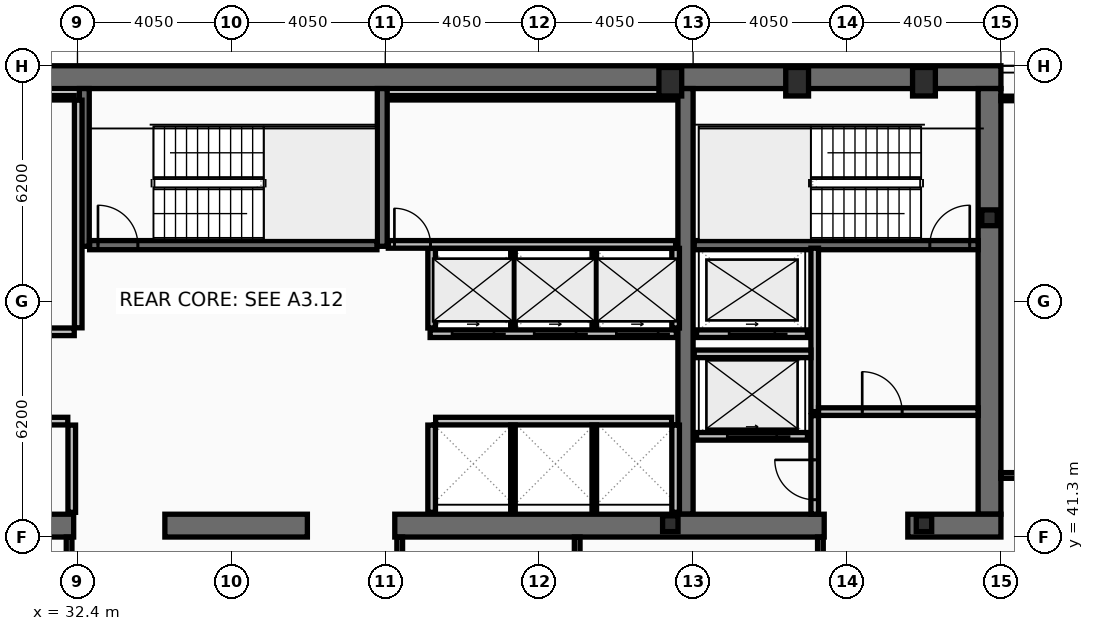
"""IFC4 building model, lengths in metres.
Left out: names, types, materials, properties, quantities, classifications, styles, units other than length and angle.
Written with IfcOpenShell. Run it as: python <this file> out.ifc"""

import sys

from ifc_helpers import new_model, si_unit, direction, frame, frame_2d, origin, origin_2d, place, context, subcontext, project, spatial, rectangle, hollow_rectangle, i_section, extrude, element, fill, save


model = new_model("IFC4")
c1 = context("Model", 3, precision=1e-05, world=origin(), true_north=direction((0.0, 1.0)))
c2 = subcontext(c1, "Body", "Model", "MODEL_VIEW")
j1 = project(units=[si_unit("LENGTHUNIT", "METRE"), si_unit("PLANEANGLEUNIT", "RADIAN")], contexts=[c1])
p1 = place(None, origin())
s1 = spatial("IfcSite", under=j1, at=p1, CompositionType="ELEMENT")
p2 = place(p1, origin())
s2 = spatial("IfcBuilding", under=s1, at=p2, CompositionType="ELEMENT")
p3 = place(p2, frame((0.0, 0.0, 203.0)))
s3 = spatial("IfcBuildingStorey", under=s2, at=p3, CompositionType="ELEMENT", Elevation=203.0)
p4 = place(p3, frame((16.2, 53.4, 0.0), z_axis=(0.0, 0.0, 1.0), x_axis=(1.0, 0.0, 0.0)))
e1 = element("IfcWall", 1, at=p4, inside=s3, PredefinedType="SHEAR", context=c2, shape_type="SweptSolid", body=[
    extrude(rectangle(XDim=40.5, YDim=0.6, at=frame_2d((20.25, 0.0))), origin(), (0.0, 0.0, 1.0), 3.44),
])
p5 = place(p3, frame((56.4, 53.1, 0.0), z_axis=(0.0, 0.0, 1.0), x_axis=(0.0, -1.0, 0.0)))
e2 = element("IfcWall", 2, at=p5, inside=s3, PredefinedType="SHEAR", context=c2, shape_type="SweptSolid", body=[
    extrude(rectangle(XDim=11.2, YDim=0.6, at=frame_2d((5.6, 0.0))), origin(), (0.0, 0.0, 1.0), 3.44),
])
p6 = place(p3, frame((48.4, 41.9, 0.0), z_axis=(0.0, 0.0, 1.0), x_axis=(0.0, 1.0, 0.0)))
e3 = element("IfcWall", 3, at=p6, inside=s3, PredefinedType="SHEAR", context=c2, shape_type="SweptSolid", body=[
    extrude(rectangle(XDim=11.2, YDim=0.4, at=frame_2d((5.6, 0.0))), origin(), (0.0, 0.0, 1.0), 3.44),
])
p7 = place(p3, frame((32.3, 41.6, 0.0), z_axis=(0.0, 0.0, 1.0), x_axis=(-1.0, 0.0, 0.0)))
e4 = element("IfcWall", 4, at=p7, inside=s3, PredefinedType="SHEAR", context=c2, shape_type="SweptSolid", body=[
    extrude(rectangle(XDim=11.45, YDim=0.6, at=frame_2d((5.725, 0.0))), origin(), (0.0, 0.0, 1.0), 3.44),
])
p8 = place(p3, frame((38.45, 41.6, 0.0), z_axis=(0.0, 0.0, 1.0), x_axis=(-1.0, 0.0, 0.0)))
e5 = element("IfcWall", 5, at=p8, inside=s3, PredefinedType="SHEAR", context=c2, shape_type="SweptSolid", body=[
    extrude(rectangle(XDim=3.75, YDim=0.6, at=frame_2d((1.875, 0.0))), origin(), (0.0, 0.0, 1.0), 3.44),
])
p9 = place(p3, frame((52.05, 41.6, 0.0), z_axis=(0.0, 0.0, 1.0), x_axis=(-1.0, 0.0, 0.0)))
e6 = element("IfcWall", 6, at=p9, inside=s3, PredefinedType="SHEAR", context=c2, shape_type="SweptSolid", body=[
    extrude(rectangle(XDim=11.3, YDim=0.6, at=frame_2d((5.65, 0.0))), origin(), (0.0, 0.0, 1.0), 3.44),
])
p10 = place(p3, frame((56.7, 41.6, 0.0), z_axis=(0.0, 0.0, 1.0), x_axis=(-1.0, 0.0, 0.0)))
e7 = element("IfcWall", 7, at=p10, inside=s3, PredefinedType="SHEAR", context=c2, shape_type="SweptSolid", body=[
    extrude(rectangle(XDim=2.45, YDim=0.6, at=frame_2d((1.225, 0.0))), origin(), (0.0, 0.0, 1.0), 3.44),
])
for number, where, z_axis, x_axis in (
    (8, (32.58, 48.95, 0.0), (0.0, 0.0, 1.0), (0.0, 1.0, 0.0)),
    (9, (40.42, 48.95, 0.0), (0.0, 0.0, 1.0), (0.0, 1.0, 0.0)),
):
    element("IfcWall", number, at=place(p3, frame(where, z_axis=z_axis, x_axis=x_axis)), inside=s3, PredefinedType="SHEAR", context=c2, shape_type="SweptSolid", body=[
        extrude(rectangle(XDim=4.15, YDim=0.26, at=frame_2d((2.075, 0.0))), origin(), (0.0, 0.0, 1.0), 3.44),
    ])
p11 = place(p3, frame((48.63, 48.98, 0.0), z_axis=(0.0, 0.0, 1.0), x_axis=(1.0, 0.0, 0.0)))
e10 = element("IfcWall", 10, at=p11, inside=s3, PredefinedType="SHEAR", context=c2, shape_type="SweptSolid", body=[
    extrude(rectangle(XDim=7.47, YDim=0.24, at=frame_2d((3.735, 0.0))), origin(), (0.0, 0.0, 1.0), 3.44),
])
p12 = place(p11, frame((6.2, 0.0, 0.0)))
e11 = element("IfcOpeningElement", 11, at=p12, cuts=e10, PredefinedType="OPENING", context=c2, shape_type="SweptSolid", body=[
    extrude(rectangle(XDim=1.05, YDim=2.15, at=frame_2d((0.525, 1.075))), frame((0.0, 0.13, 0.0), z_axis=(0.0, -1.0, 0.0), x_axis=(1.0, 0.0, 0.0)), (0.0, 0.0, 1.0), 0.26),
])
p13 = place(p3, frame((32.72, 48.98, 0.0), z_axis=(0.0, 0.0, 1.0), x_axis=(1.0, 0.0, 0.0)))
e12 = element("IfcWall", 12, at=p13, inside=s3, PredefinedType="SHEAR", context=c2, shape_type="SweptSolid", body=[
    extrude(rectangle(XDim=7.56, YDim=0.24, at=frame_2d((3.78, 0.0))), origin(), (0.0, 0.0, 1.0), 3.44),
])
p14 = place(p13, frame((0.22, 0.0, 0.0)))
e13 = element("IfcOpeningElement", 13, at=p14, cuts=e12, PredefinedType="OPENING", context=c2, shape_type="SweptSolid", body=[
    extrude(rectangle(XDim=1.05, YDim=2.15, at=frame_2d((0.525, 1.075))), frame((0.0, 0.13, 0.0), z_axis=(0.0, -1.0, 0.0), x_axis=(1.0, 0.0, 0.0)), (0.0, 0.0, 1.0), 0.26),
])
for number, where, z_axis, x_axis in (
    (14, (48.0, 53.28, 0.0), (0.0, 0.0, 1.0), (1.0, 0.0, 0.0)),
    (15, (51.337, 53.28, 0.0), (0.0, 0.0, 1.0), (1.0, 0.0, 0.0)),
    (16, (54.675, 53.28, 0.0), (0.0, 0.0, 1.0), (1.0, 0.0, 0.0)),
):
    element("IfcColumn", number, at=place(p3, frame(where, z_axis=z_axis, x_axis=x_axis)), inside=s3, PredefinedType="COLUMN", context=c2, shape_type="SweptSolid", body=[
        extrude(hollow_rectangle(XDim=0.6, YDim=0.75, WallThickness=0.045, at=origin_2d()), origin(), (0.0, 0.0, 1.0), 3.6),
    ])
for number, where, z_axis, x_axis in (
    (17, (56.4, 49.7, 0.0), (0.0, 0.0, 1.0), (1.0, 0.0, 0.0)),
    (18, (48.0, 41.65, 0.0), (0.0, 0.0, 1.0), (1.0, 0.0, 0.0)),
    (19, (54.675, 41.65, 0.0), (0.0, 0.0, 1.0), (1.0, 0.0, 0.0)),
):
    element("IfcColumn", number, at=place(p3, frame(where, z_axis=z_axis, x_axis=x_axis)), inside=s3, PredefinedType="COLUMN", context=c2, shape_type="SweptSolid", body=[
        extrude(i_section(OverallWidth=0.406, OverallDepth=0.416, WebThickness=0.03, FlangeThickness=0.048, at=origin_2d()), origin(), (0.0, 0.0, 1.0), 3.6),
    ])
p15 = place(p3, frame((51.61, 43.95, 0.0), z_axis=(0.0, 0.0, 1.0), x_axis=(-1.0, 0.0, 0.0)))
e20 = element("IfcWall", 20, at=p15, inside=s3, PredefinedType="PARTITIONING", context=c2, shape_type="SweptSolid", body=[
    extrude(rectangle(XDim=2.92, YDim=0.2, at=frame_2d((1.46, 0.0))), origin(), (0.0, 0.0, 1.0), 3.44),
])
p16 = place(p15, frame((0.81, 0.0, 0.0)))
e21 = element("IfcOpeningElement", 21, at=p16, cuts=e20, PredefinedType="OPENING", context=c2, shape_type="SweptSolid", body=[
    extrude(rectangle(XDim=1.3, YDim=2.18, at=frame_2d((0.65, 1.09))), frame((0.0, 0.11, 0.0), z_axis=(0.0, -1.0, 0.0), x_axis=(1.0, 0.0, 0.0)), (0.0, 0.0, 1.0), 0.22),
])
p17 = place(p3, frame((51.61, 46.65, 0.0), z_axis=(0.0, 0.0, 1.0), x_axis=(-1.0, 0.0, 0.0)))
e22 = element("IfcWall", 22, at=p17, inside=s3, PredefinedType="PARTITIONING", context=c2, shape_type="SweptSolid", body=[
    extrude(rectangle(XDim=2.92, YDim=0.2, at=frame_2d((1.46, 0.0))), origin(), (0.0, 0.0, 1.0), 3.44),
])
p18 = place(p17, frame((0.86, 0.0, 0.0)))
e23 = element("IfcOpeningElement", 23, at=p18, cuts=e22, PredefinedType="OPENING", context=c2, shape_type="SweptSolid", body=[
    extrude(rectangle(XDim=1.2, YDim=2.18, at=frame_2d((0.6, 1.09))), frame((0.0, 0.11, 0.0), z_axis=(0.0, -1.0, 0.0), x_axis=(1.0, 0.0, 0.0)), (0.0, 0.0, 1.0), 0.22),
])
p19 = place(p3, frame((48.16, 46.65, 0.0), z_axis=(0.0, 0.0, 1.0), x_axis=(-1.0, 0.0, 0.0)))
e24 = element("IfcWall", 24, at=p19, inside=s3, PredefinedType="PARTITIONING", context=c2, shape_type="SweptSolid", body=[
    extrude(rectangle(XDim=6.48, YDim=0.2, at=frame_2d((3.24, 0.0))), origin(), (0.0, 0.0, 1.0), 3.44),
])
p20 = place(p19, frame((4.8, 0.0, 0.0)))
e25 = element("IfcOpeningElement", 25, at=p20, cuts=e24, PredefinedType="OPENING", context=c2, shape_type="SweptSolid", body=[
    extrude(rectangle(XDim=1.1, YDim=2.18, at=frame_2d((0.55, 1.09))), frame((0.0, 0.11, 0.0), z_axis=(0.0, -1.0, 0.0), x_axis=(1.0, 0.0, 0.0)), (0.0, 0.0, 1.0), 0.22),
])
p21 = place(p19, frame((2.64, 0.0, 0.0)))
e26 = element("IfcOpeningElement", 26, at=p21, cuts=e24, PredefinedType="OPENING", context=c2, shape_type="SweptSolid", body=[
    extrude(rectangle(XDim=1.1, YDim=2.18, at=frame_2d((0.55, 1.09))), frame((0.0, 0.11, 0.0), z_axis=(0.0, -1.0, 0.0), x_axis=(1.0, 0.0, 0.0)), (0.0, 0.0, 1.0), 0.22),
])
p22 = place(p19, frame((0.48, 0.0, 0.0)))
e27 = element("IfcOpeningElement", 27, at=p22, cuts=e24, PredefinedType="OPENING", context=c2, shape_type="SweptSolid", body=[
    extrude(rectangle(XDim=1.1, YDim=2.18, at=frame_2d((0.55, 1.09))), frame((0.0, 0.11, 0.0), z_axis=(0.0, -1.0, 0.0), x_axis=(1.0, 0.0, 0.0)), (0.0, 0.0, 1.0), 0.22),
])
p23 = place(p3, frame((51.8, 44.6, 0.0), z_axis=(0.0, 0.0, 1.0), x_axis=(0.0, 1.0, 0.0)))
e28 = element("IfcWall", 28, at=p23, inside=s3, PredefinedType="PARTITIONING", context=c2, shape_type="SweptSolid", body=[
    extrude(rectangle(XDim=4.3, YDim=0.2, at=frame_2d((2.15, 0.0))), origin(), (0.0, 0.0, 1.0), 3.44),
])
p24 = place(p3, frame((51.9, 44.6, 0.0), z_axis=(0.0, 0.0, 1.0), x_axis=(1.0, 0.0, 0.0)))
e29 = element("IfcWall", 29, at=p24, inside=s3, PredefinedType="PARTITIONING", context=c2, shape_type="SweptSolid", body=[
    extrude(rectangle(XDim=4.2, YDim=0.2, at=frame_2d((2.1, 0.0))), origin(), (0.0, 0.0, 1.0), 3.44),
])
p25 = place(p24, frame((1.15, 0.0, 0.0)))
e30 = element("IfcOpeningElement", 30, at=p25, cuts=e29, PredefinedType="OPENING", context=c2, shape_type="SweptSolid", body=[
    extrude(rectangle(XDim=1.05, YDim=2.15, at=frame_2d((0.525, 1.075))), frame((0.0, 0.11, 0.0), z_axis=(0.0, -1.0, 0.0), x_axis=(1.0, 0.0, 0.0)), (0.0, 0.0, 1.0), 0.22),
])
p26 = place(p3, frame((48.63, 46.12, 0.0), z_axis=(0.0, 0.0, 1.0), x_axis=(1.0, 0.0, 0.0)))
e31 = element("IfcWall", 31, at=p26, inside=s3, PredefinedType="PARTITIONING", context=c2, shape_type="SweptSolid", body=[
    extrude(rectangle(XDim=3.07, YDim=0.2, at=frame_2d((1.535, 0.0))), origin(), (0.0, 0.0, 1.0), 3.44),
])
p27 = place(p3, frame((51.8, 41.9, 0.0), z_axis=(0.0, 0.0, 1.0), x_axis=(0.0, 1.0, 0.0)))
e32 = element("IfcWall", 32, at=p27, inside=s3, PredefinedType="PARTITIONING", context=c2, shape_type="SweptSolid", body=[
    extrude(rectangle(XDim=2.595, YDim=0.2, at=frame_2d((1.298, 0.0))), origin(), (0.0, 0.0, 1.0), 3.44),
])
p28 = place(p27, frame((0.38, 0.0, 0.0)))
e33 = element("IfcOpeningElement", 33, at=p28, cuts=e32, PredefinedType="OPENING", context=c2, shape_type="SweptSolid", body=[
    extrude(rectangle(XDim=1.05, YDim=2.15, at=frame_2d((0.525, 1.075))), frame((0.0, 0.11, 0.0), z_axis=(0.0, -1.0, 0.0), x_axis=(1.0, 0.0, 0.0)), (0.0, 0.0, 1.0), 0.22),
])
p29 = place(p3, frame((32.42, 46.805, 0.0), z_axis=(0.0, 0.0, 1.0), x_axis=(0.0, 1.0, 0.0)))
e34 = element("IfcWall", 34, at=p29, inside=s3, PredefinedType="PARTITIONING", context=c2, shape_type="SweptSolid", body=[
    extrude(rectangle(XDim=5.99, YDim=0.2, at=frame_2d((2.995, 0.0))), origin(), (0.0, 0.0, 1.0), 3.44),
])
p30 = place(p3, frame((24.805, 52.86, 0.0), z_axis=(0.0, 0.0, 1.0), x_axis=(1.0, 0.0, 0.0)))
e35 = element("IfcWall", 35, at=p30, inside=s3, PredefinedType="PARTITIONING", context=c2, shape_type="SweptSolid", body=[
    extrude(rectangle(XDim=7.51, YDim=0.12, at=frame_2d((3.755, 0.0))), origin(), (0.0, 0.0, 1.0), 3.44),
])
p31 = place(p3, frame((24.805, 46.7, 0.0), z_axis=(0.0, 0.0, 1.0), x_axis=(1.0, 0.0, 0.0)))
e36 = element("IfcWall", 36, at=p31, inside=s3, PredefinedType="PARTITIONING", context=c2, shape_type="SweptSolid", body=[
    extrude(rectangle(XDim=7.51, YDim=0.2, at=frame_2d((3.755, 0.0))), origin(), (0.0, 0.0, 1.0), 3.44),
])
p32 = place(p31, frame((0.55, 0.0, 0.0)))
e37 = element("IfcOpeningElement", 37, at=p32, cuts=e36, PredefinedType="OPENING", context=c2, shape_type="SweptSolid", body=[
    extrude(rectangle(XDim=0.95, YDim=2.1, at=frame_2d((0.475, 1.05))), frame((0.0, 0.11, 0.0), z_axis=(0.0, -1.0, 0.0), x_axis=(1.0, 0.0, 0.0)), (0.0, 0.0, 1.0), 0.22),
])
p33 = place(p31, frame((3.784, 0.0, 0.0)))
e38 = element("IfcOpeningElement", 38, at=p33, cuts=e36, PredefinedType="OPENING", context=c2, shape_type="SweptSolid", body=[
    extrude(rectangle(XDim=0.95, YDim=2.1, at=frame_2d((0.475, 1.05))), frame((0.0, 0.11, 0.0), z_axis=(0.0, -1.0, 0.0), x_axis=(1.0, 0.0, 0.0)), (0.0, 0.0, 1.0), 0.22),
])
p34 = place(p3, frame((32.25, 41.95, 0.0), z_axis=(0.0, 0.0, 1.0), x_axis=(0.0, 1.0, 0.0)))
e39 = element("IfcWall", 39, at=p34, inside=s3, PredefinedType="PARTITIONING", context=c2, shape_type="SweptSolid", body=[
    extrude(rectangle(XDim=2.295, YDim=0.2, at=frame_2d((1.147, 0.0))), origin(), (0.0, 0.0, 1.0), 3.44),
])
p35 = place(p3, frame((24.805, 44.35, 0.0), z_axis=(0.0, 0.0, 1.0), x_axis=(1.0, 0.0, 0.0)))
e40 = element("IfcWall", 40, at=p35, inside=s3, PredefinedType="PARTITIONING", context=c2, shape_type="SweptSolid", body=[
    extrude(rectangle(XDim=7.34, YDim=0.2, at=frame_2d((3.67, 0.0))), origin(), (0.0, 0.0, 1.0), 3.44),
])
p36 = place(p35, frame((0.55, 0.0, 0.0)))
e41 = element("IfcOpeningElement", 41, at=p36, cuts=e40, PredefinedType="OPENING", context=c2, shape_type="SweptSolid", body=[
    extrude(rectangle(XDim=0.95, YDim=2.1, at=frame_2d((0.475, 1.05))), frame((0.0, 0.11, 0.0), z_axis=(0.0, -1.0, 0.0), x_axis=(1.0, 0.0, 0.0)), (0.0, 0.0, 1.0), 0.22),
])
p37 = place(p35, frame((3.719, 0.0, 0.0)))
e42 = element("IfcOpeningElement", 42, at=p37, cuts=e40, PredefinedType="OPENING", context=c2, shape_type="SweptSolid", body=[
    extrude(rectangle(XDim=0.95, YDim=2.1, at=frame_2d((0.475, 1.05))), frame((0.0, 0.11, 0.0), z_axis=(0.0, -1.0, 0.0), x_axis=(1.0, 0.0, 0.0)), (0.0, 0.0, 1.0), 0.22),
])
for number, where, z_axis, x_axis in (
    (43, (41.72, 46.8, 0.0), (0.0, 0.0, 1.0), (0.0, 1.0, 0.0)),
    (44, (48.14, 46.8, 0.0), (0.0, 0.0, 1.0), (0.0, 1.0, 0.0)),
):
    element("IfcWall", number, at=place(p3, frame(where, z_axis=z_axis, x_axis=x_axis)), inside=s3, PredefinedType="PARTITIONING", context=c2, shape_type="SweptSolid", body=[
        extrude(rectangle(XDim=2.095, YDim=0.2, at=frame_2d((1.047, 0.0))), origin(), (0.0, 0.0, 1.0), 3.44),
    ])
for number, where, z_axis, x_axis in (
    (45, (43.86, 46.8, 0.0), (0.0, 0.0, 1.0), (0.0, 1.0, 0.0)),
    (46, (46.0, 46.8, 0.0), (0.0, 0.0, 1.0), (0.0, 1.0, 0.0)),
):
    element("IfcWall", number, at=place(p3, frame(where, z_axis=z_axis, x_axis=x_axis)), inside=s3, PredefinedType="PARTITIONING", context=c2, shape_type="SweptSolid", body=[
        extrude(rectangle(XDim=2.095, YDim=0.12, at=frame_2d((1.047, 0.0))), origin(), (0.0, 0.0, 1.0), 3.44),
    ])
p38 = place(p3, frame((41.825, 44.35, 0.0), z_axis=(0.0, 0.0, 1.0), x_axis=(1.0, 0.0, 0.0)))
e47 = element("IfcWall", 47, at=p38, inside=s3, PredefinedType="PARTITIONING", context=c2, shape_type="SweptSolid", body=[
    extrude(rectangle(XDim=6.21, YDim=0.2, at=frame_2d((3.105, 0.0))), origin(), (0.0, 0.0, 1.0), 3.44),
])
for number, where, z_axis, x_axis in (
    (48, (41.72, 41.95, 0.0), (0.0, 0.0, 1.0), (0.0, 1.0, 0.0)),
    (49, (48.14, 41.95, 0.0), (0.0, 0.0, 1.0), (0.0, 1.0, 0.0)),
):
    element("IfcWall", number, at=place(p3, frame(where, z_axis=z_axis, x_axis=x_axis)), inside=s3, PredefinedType="PARTITIONING", context=c2, shape_type="SweptSolid", body=[
        extrude(rectangle(XDim=2.295, YDim=0.2, at=frame_2d((1.147, 0.0))), origin(), (0.0, 0.0, 1.0), 3.44),
    ])
for number, where, z_axis, x_axis in (
    (50, (43.86, 41.95, 0.0), (0.0, 0.0, 1.0), (0.0, 1.0, 0.0)),
    (51, (46.0, 41.95, 0.0), (0.0, 0.0, 1.0), (0.0, 1.0, 0.0)),
):
    element("IfcWall", number, at=place(p3, frame(where, z_axis=z_axis, x_axis=x_axis)), inside=s3, PredefinedType="PARTITIONING", context=c2, shape_type="SweptSolid", body=[
        extrude(rectangle(XDim=2.295, YDim=0.12, at=frame_2d((1.147, 0.0))), origin(), (0.0, 0.0, 1.0), 3.44),
    ])
p39 = place(p3, frame((40.58, 52.86, 0.0), z_axis=(0.0, 0.0, 1.0), x_axis=(1.0, 0.0, 0.0)))
e52 = element("IfcWall", 52, at=p39, inside=s3, PredefinedType="PARTITIONING", context=c2, shape_type="SweptSolid", body=[
    extrude(rectangle(XDim=7.56, YDim=0.12, at=frame_2d((3.78, 0.0))), origin(), (0.0, 0.0, 1.0), 3.44),
])
p40 = place(p3, frame((40.58, 49.0, 0.0), z_axis=(0.0, 0.0, 1.0), x_axis=(1.0, 0.0, 0.0)))
e53 = element("IfcWall", 53, at=p40, inside=s3, PredefinedType="PARTITIONING", context=c2, shape_type="SweptSolid", body=[
    extrude(rectangle(XDim=7.56, YDim=0.2, at=frame_2d((3.78, 0.0))), origin(), (0.0, 0.0, 1.0), 3.44),
])
p41 = place(p40, frame((0.16, 0.0, 0.0)))
e54 = element("IfcOpeningElement", 54, at=p41, cuts=e53, PredefinedType="OPENING", context=c2, shape_type="SweptSolid", body=[
    extrude(rectangle(XDim=0.95, YDim=2.1, at=frame_2d((0.475, 1.05))), frame((0.0, 0.11, 0.0), z_axis=(0.0, -1.0, 0.0), x_axis=(1.0, 0.0, 0.0)), (0.0, 0.0, 1.0), 0.22),
])
for number, where, z_axis, x_axis in (
    (55, (32.18, 38.28, 0.0), (0.0, 0.0, 1.0), (0.0, 1.0, 0.0)),
    (56, (40.88, 38.28, 0.0), (0.0, 0.0, 1.0), (0.0, 1.0, 0.0)),
    (57, (45.55, 38.28, 0.0), (0.0, 0.0, 1.0), (0.0, 1.0, 0.0)),
    (58, (51.95, 38.28, 0.0), (0.0, 0.0, 1.0), (0.0, 1.0, 0.0)),
):
    element("IfcWall", number, at=place(p3, frame(where, z_axis=z_axis, x_axis=x_axis)), inside=s3, PredefinedType="PARTITIONING", context=c2, shape_type="SweptSolid", body=[
        extrude(rectangle(XDim=3.02, YDim=0.15, at=frame_2d((1.51, 0.0))), origin(), (0.0, 0.0, 1.0), 3.44),
    ])
p42 = place(p3, frame((56.7, 42.92, 0.0), z_axis=(0.0, 0.0, 1.0), x_axis=(1.0, 0.0, 0.0)))
e59 = element("IfcWall", 59, at=p42, inside=s3, PredefinedType="PARTITIONING", context=c2, shape_type="SweptSolid", body=[
    extrude(rectangle(XDim=8.105, YDim=0.15, at=frame_2d((4.052, 0.0))), origin(), (0.0, 0.0, 1.0), 2.73),
])
p43 = place(p42, frame((0.9, 0.0, 0.0)))
e60 = element("IfcOpeningElement", 60, at=p43, cuts=e59, PredefinedType="OPENING", context=c2, shape_type="SweptSolid", body=[
    extrude(rectangle(XDim=0.9, YDim=2.05, at=frame_2d((0.45, 1.025))), frame((0.0, 0.085, 0.0), z_axis=(0.0, -1.0, 0.0), x_axis=(1.0, 0.0, 0.0)), (0.0, 0.0, 1.0), 0.17),
])
p44 = place(p3, frame((56.7, 52.84, 0.0), z_axis=(0.0, 0.0, 1.0), x_axis=(1.0, 0.0, 0.0)))
e61 = element("IfcWall", 61, at=p44, inside=s3, PredefinedType="PARTITIONING", context=c2, shape_type="SweptSolid", body=[
    extrude(rectangle(XDim=8.105, YDim=0.12, at=frame_2d((4.052, 0.0))), origin(), (0.0, 0.0, 1.0), 3.44),
])
p45 = place(p12, origin())
e62 = element("IfcDoor", 62, at=p45, inside=s3, OperationType="SINGLE_SWING_RIGHT", PredefinedType="DOOR", context=c2, shape_type="SweptSolid", body=[
    extrude(rectangle(XDim=1.05, YDim=2.15, at=frame_2d((0.525, 1.075))), frame((0.0, 0.025, 0.0), z_axis=(0.0, -1.0, 0.0), x_axis=(1.0, 0.0, 0.0)), (0.0, 0.0, 1.0), 0.05),
])
fill(e11, e62)
p46 = place(p14, origin())
e63 = element("IfcDoor", 63, at=p46, inside=s3, OperationType="SINGLE_SWING_LEFT", PredefinedType="DOOR", context=c2, shape_type="SweptSolid", body=[
    extrude(rectangle(XDim=1.05, YDim=2.15, at=frame_2d((0.525, 1.075))), frame((0.0, 0.025, 0.0), z_axis=(0.0, -1.0, 0.0), x_axis=(1.0, 0.0, 0.0)), (0.0, 0.0, 1.0), 0.05),
])
fill(e13, e63)
p47 = place(p16, origin())
e64 = element("IfcDoor", 64, at=p47, inside=s3, OperationType="SLIDING_TO_LEFT", PredefinedType="DOOR", context=c2, shape_type="SweptSolid", body=[
    extrude(rectangle(XDim=1.3, YDim=2.18, at=frame_2d((0.65, 1.09))), frame((0.0, 0.025, 0.0), z_axis=(0.0, -1.0, 0.0), x_axis=(1.0, 0.0, 0.0)), (0.0, 0.0, 1.0), 0.05),
])
fill(e21, e64)
p48 = place(p18, origin())
e65 = element("IfcDoor", 65, at=p48, inside=s3, OperationType="SLIDING_TO_LEFT", PredefinedType="DOOR", context=c2, shape_type="SweptSolid", body=[
    extrude(rectangle(XDim=1.2, YDim=2.18, at=frame_2d((0.6, 1.09))), frame((0.0, 0.025, 0.0), z_axis=(0.0, -1.0, 0.0), x_axis=(1.0, 0.0, 0.0)), (0.0, 0.0, 1.0), 0.05),
])
fill(e23, e65)
p49 = place(p20, origin())
e66 = element("IfcDoor", 66, at=p49, inside=s3, OperationType="SLIDING_TO_LEFT", PredefinedType="DOOR", context=c2, shape_type="SweptSolid", body=[
    extrude(rectangle(XDim=1.1, YDim=2.18, at=frame_2d((0.55, 1.09))), frame((0.0, 0.025, 0.0), z_axis=(0.0, -1.0, 0.0), x_axis=(1.0, 0.0, 0.0)), (0.0, 0.0, 1.0), 0.05),
])
fill(e25, e66)
p50 = place(p21, origin())
e67 = element("IfcDoor", 67, at=p50, inside=s3, OperationType="SLIDING_TO_LEFT", PredefinedType="DOOR", context=c2, shape_type="SweptSolid", body=[
    extrude(rectangle(XDim=1.1, YDim=2.18, at=frame_2d((0.55, 1.09))), frame((0.0, 0.025, 0.0), z_axis=(0.0, -1.0, 0.0), x_axis=(1.0, 0.0, 0.0)), (0.0, 0.0, 1.0), 0.05),
])
fill(e26, e67)
p51 = place(p22, origin())
e68 = element("IfcDoor", 68, at=p51, inside=s3, OperationType="SLIDING_TO_LEFT", PredefinedType="DOOR", context=c2, shape_type="SweptSolid", body=[
    extrude(rectangle(XDim=1.1, YDim=2.18, at=frame_2d((0.55, 1.09))), frame((0.0, 0.025, 0.0), z_axis=(0.0, -1.0, 0.0), x_axis=(1.0, 0.0, 0.0)), (0.0, 0.0, 1.0), 0.05),
])
fill(e27, e68)
p52 = place(p25, origin())
e69 = element("IfcDoor", 69, at=p52, inside=s3, OperationType="SINGLE_SWING_LEFT", PredefinedType="DOOR", context=c2, shape_type="SweptSolid", body=[
    extrude(rectangle(XDim=1.05, YDim=2.15, at=frame_2d((0.525, 1.075))), frame((0.0, 0.025, 0.0), z_axis=(0.0, -1.0, 0.0), x_axis=(1.0, 0.0, 0.0)), (0.0, 0.0, 1.0), 0.05),
])
fill(e30, e69)
p53 = place(p28, origin())
e70 = element("IfcDoor", 70, at=p53, inside=s3, OperationType="SINGLE_SWING_RIGHT", PredefinedType="DOOR", context=c2, shape_type="SweptSolid", body=[
    extrude(rectangle(XDim=1.05, YDim=2.15, at=frame_2d((0.525, 1.075))), frame((0.0, 0.025, 0.0), z_axis=(0.0, -1.0, 0.0), x_axis=(1.0, 0.0, 0.0)), (0.0, 0.0, 1.0), 0.05),
])
fill(e33, e70)
p54 = place(p41, origin())
e71 = element("IfcDoor", 71, at=p54, inside=s3, OperationType="SINGLE_SWING_LEFT", PredefinedType="DOOR", context=c2, shape_type="SweptSolid", body=[
    extrude(rectangle(XDim=0.95, YDim=2.1, at=frame_2d((0.475, 1.05))), frame((0.0, 0.025, 0.0), z_axis=(0.0, -1.0, 0.0), x_axis=(1.0, 0.0, 0.0)), (0.0, 0.0, 1.0), 0.05),
])
fill(e54, e71)
save(model, sys.argv[1])
